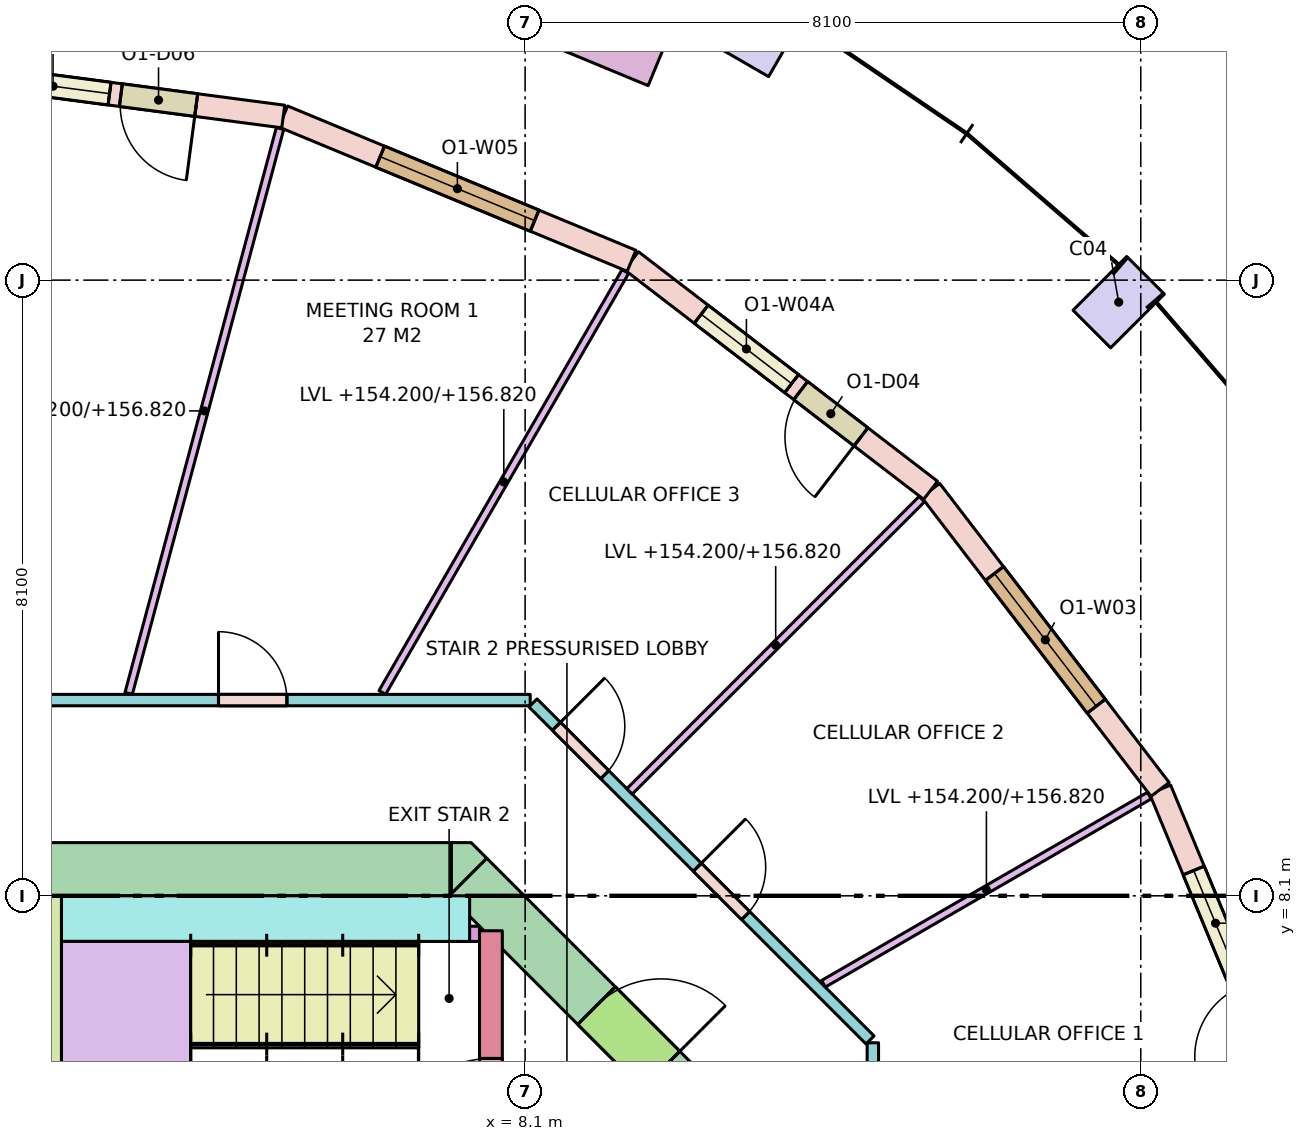
"""IFC4 building model, lengths in metres.
Left out: names, types, materials, properties, quantities, classifications, styles, units other than length and angle.
Written with IfcOpenShell. Run it as: python <this file> out.ifc"""

import sys

from ifc_helpers import new_model, si_unit, direction, frame, frame_2d, origin, origin_2d, place, context, subcontext, project, spatial, polyline, rectangle, outline, extrude, element, fill, save


model = new_model("IFC4")
c1 = context("Model", 3, precision=1e-05, world=origin(), true_north=direction((0.0, 1.0)))
c2 = subcontext(c1, "Body", "Model", "MODEL_VIEW")
j1 = project(units=[si_unit("LENGTHUNIT", "METRE"), si_unit("PLANEANGLEUNIT", "RADIAN")], contexts=[c1])
p1 = place(None, origin())
s1 = spatial("IfcSite", under=j1, at=p1, CompositionType="ELEMENT")
p2 = place(p1, origin())
s2 = spatial("IfcBuilding", under=s1, at=p2, CompositionType="ELEMENT")
p3 = place(p2, frame((0.0, 0.0, 154.2)))
s3 = spatial("IfcBuildingStorey", under=s2, at=p3, CompositionType="ELEMENT", Elevation=154.2)
for number, where, z_axis, x_axis in (
    (1, (15.91, 15.91, 0.0), (0.0, 0.0, 1.0), (-0.707, 0.707, 0.0)),
    (2, (11.25, 19.486, 0.0), (0.0, 0.0, 1.0), (-0.866, 0.5, 0.0)),
):
    element("IfcColumn", number, at=place(p3, frame(where, z_axis=z_axis, x_axis=x_axis)), inside=s3, PredefinedType="COLUMN", context=c2, shape_type="SweptSolid", body=[
        extrude(rectangle(XDim=0.7, YDim=1.0, at=origin_2d()), origin(), (0.0, 0.0, 1.0), 3.7),
    ])
p4 = place(p3, frame((-7.13, 8.45, -0.28), z_axis=(0.0, 0.0, 1.0), x_axis=(1.0, 0.0, 0.0)))
e3 = element("IfcWall", 3, at=p4, inside=s3, PredefinedType="SHEAR", context=c2, shape_type="SweptSolid", body=[
    extrude(rectangle(XDim=14.26, YDim=0.7, at=frame_2d((7.13, 0.0))), origin(), (0.0, 0.0, 1.0), 3.7),
])
p5 = place(p4, frame((5.48, 0.0, 0.28)))
e4 = element("IfcOpeningElement", 4, at=p5, cuts=e3, PredefinedType="OPENING", context=c2, shape_type="SweptSolid", body=[
    extrude(rectangle(XDim=0.7, YDim=2.1, at=frame_2d((0.35, 1.05))), frame((0.0, 0.36, 0.0), z_axis=(0.0, -1.0, 0.0), x_axis=(1.0, 0.0, 0.0)), (0.0, 0.0, 1.0), 0.72),
])
p6 = place(p4, frame((7.155, 0.0, 0.28)))
e5 = element("IfcOpeningElement", 5, at=p6, cuts=e3, PredefinedType="OPENING", context=c2, shape_type="SweptSolid", body=[
    extrude(rectangle(XDim=0.9, YDim=2.1, at=frame_2d((0.45, 1.05))), frame((0.0, 0.36, 0.0), z_axis=(0.0, -1.0, 0.0), x_axis=(1.0, 0.0, 0.0)), (0.0, 0.0, 1.0), 0.72),
])
p7 = place(p3, frame((7.347, 8.347, -0.28), z_axis=(0.0, 0.0, 1.0), x_axis=(0.707106781187, -0.707106781187, 0.0)))
e6 = element("IfcWall", 6, at=p7, inside=s3, PredefinedType="SHEAR", context=c2, shape_type="SweptSolid", body=[
    extrude(rectangle(XDim=4.243, YDim=0.7, at=frame_2d((2.121, 0.0))), origin(), (0.0, 0.0, 1.0), 3.7),
])
p8 = place(p7, frame((2.393, 0.0, 0.28)))
e7 = element("IfcOpeningElement", 7, at=p8, cuts=e6, PredefinedType="OPENING", context=c2, shape_type="SweptSolid", body=[
    extrude(rectangle(XDim=1.2, YDim=2.1, at=frame_2d((0.6, 1.05))), frame((0.0, 0.36, 0.0), z_axis=(0.0, -1.0, 0.0), x_axis=(1.0, 0.0, 0.0)), (0.0, 0.0, 1.0), 0.72),
])
p9 = place(p3, frame((0.0, 0.0, -0.28)))
e8 = element("IfcWall", 8, at=p9, inside=s3, PredefinedType="SHEAR", context=c2, shape_type="SweptSolid", body=[
    extrude(outline(polyline([(7.39, 8.8), (7.595, 8.595), (7.595, 8.595), (7.595, 8.595), (7.13, 8.13), (7.13, 8.8), (7.13, 8.8), (7.39, 8.8)])), origin(), (0.0, 0.0, 1.0), 3.7),
])
p10 = place(p3, frame((1.85, 1.5, 0.0), z_axis=(0.0, 0.0, 1.0), x_axis=(0.0, 1.0, 0.0)))
e9 = element("IfcWall", 9, at=p10, inside=s3, PredefinedType="SHEAR", context=c2, shape_type="SweptSolid", body=[
    extrude(rectangle(XDim=6.6, YDim=0.3, at=frame_2d((3.3, 0.0))), origin(), (0.0, 0.0, 1.0), 3.42),
])
p11 = place(p3, frame((7.65, 4.5, 0.0), z_axis=(0.0, 0.0, 1.0), x_axis=(0.0, 1.0, 0.0)))
e10 = element("IfcWall", 10, at=p11, inside=s3, PredefinedType="SHEAR", context=c2, shape_type="SweptSolid", body=[
    extrude(rectangle(XDim=3.14, YDim=0.3, at=frame_2d((1.57, 0.0))), origin(), (0.0, 0.0, 1.0), 3.42),
])
p12 = place(p11, frame((0.14, 0.0, 0.0)))
e11 = element("IfcOpeningElement", 11, at=p12, cuts=e10, PredefinedType="OPENING", context=c2, shape_type="SweptSolid", body=[
    extrude(rectangle(XDim=1.32, YDim=2.1, at=frame_2d((0.66, 1.05))), frame((0.0, 0.16, 0.0), z_axis=(0.0, -1.0, 0.0), x_axis=(1.0, 0.0, 0.0)), (0.0, 0.0, 1.0), 0.32),
])
p13 = place(p3, frame((2.0, 7.8, 0.0), z_axis=(0.0, 0.0, 1.0), x_axis=(1.0, 0.0, 0.0)))
e12 = element("IfcWall", 12, at=p13, inside=s3, PredefinedType="SHEAR", context=c2, shape_type="SweptSolid", body=[
    extrude(rectangle(XDim=5.37, YDim=0.6, at=frame_2d((2.685, 0.0))), origin(), (0.0, 0.0, 1.0), 3.42),
])
p14 = place(p3, frame((6.9, 7.6, 0.0), z_axis=(0.0, 0.0, 1.0), x_axis=(1.0, 0.0, 0.0)))
e13 = element("IfcWall", 13, at=p14, inside=s3, PredefinedType="SHEAR", context=c2, shape_type="SweptSolid", body=[
    extrude(rectangle(XDim=0.6, YDim=0.2, at=frame_2d((0.3, 0.0))), origin(), (0.0, 0.0, 1.0), 3.42),
])
p15 = place(p3, frame((18.353, 4.917, 0.0), z_axis=(0.0, 0.0, 1.0), x_axis=(-0.382650301762, 0.923893254961, 0.0)))
e14 = element("IfcWall", 14, at=p15, inside=s3, PredefinedType="STANDARD", context=c2, shape_type="SweptSolid", body=[
    extrude(rectangle(XDim=4.96, YDim=0.3, at=frame_2d((2.48, 0.0))), origin(), (0.0, 0.0, 1.0), 3.42),
])
p16 = place(p15, frame((1.155, 0.0, 0.0)))
e15 = element("IfcOpeningElement", 15, at=p16, cuts=e14, PredefinedType="OPENING", context=c2, shape_type="SweptSolid", body=[
    extrude(rectangle(XDim=1.0, YDim=2.4, at=frame_2d((0.5, 1.2))), frame((0.0, 0.16, 0.0), z_axis=(0.0, -1.0, 0.0), x_axis=(1.0, 0.0, 0.0)), (0.0, 0.0, 1.0), 0.32),
])
p17 = place(p15, frame((2.305, 0.0, 0.8)))
e16 = element("IfcOpeningElement", 16, at=p17, cuts=e14, PredefinedType="OPENING", context=c2, shape_type="SweptSolid", body=[
    extrude(rectangle(XDim=1.5, YDim=2.4, at=frame_2d((0.75, 1.2))), frame((0.0, 0.16, 0.0), z_axis=(0.0, -1.0, 0.0), x_axis=(1.0, 0.0, 0.0)), (0.0, 0.0, 1.0), 0.32),
])
p18 = place(p3, frame((16.455, 9.5, 0.0), z_axis=(0.0, 0.0, 1.0), x_axis=(-0.608768356425, 0.793348024649, 0.0)))
e17 = element("IfcWall", 17, at=p18, inside=s3, PredefinedType="STANDARD", context=c2, shape_type="SweptSolid", body=[
    extrude(rectangle(XDim=4.96, YDim=0.3, at=frame_2d((2.48, 0.0))), origin(), (0.0, 0.0, 1.0), 3.42),
])
p19 = place(p18, frame((1.38, 0.0, 0.8)))
e18 = element("IfcOpeningElement", 18, at=p19, cuts=e17, PredefinedType="OPENING", context=c2, shape_type="SweptSolid", body=[
    extrude(rectangle(XDim=2.2, YDim=2.4, at=frame_2d((1.1, 1.2))), frame((0.0, 0.16, 0.0), z_axis=(0.0, -1.0, 0.0), x_axis=(1.0, 0.0, 0.0)), (0.0, 0.0, 1.0), 0.32),
])
p20 = place(p3, frame((13.435, 13.435, 0.0), z_axis=(0.0, 0.0, 1.0), x_axis=(-0.793348024649, 0.608768356425, 0.0)))
e19 = element("IfcWall", 19, at=p20, inside=s3, PredefinedType="STANDARD", context=c2, shape_type="SweptSolid", body=[
    extrude(rectangle(XDim=4.96, YDim=0.3, at=frame_2d((2.48, 0.0))), origin(), (0.0, 0.0, 1.0), 3.42),
])
p21 = place(p20, frame((1.155, 0.0, 0.0)))
e20 = element("IfcOpeningElement", 20, at=p21, cuts=e19, PredefinedType="OPENING", context=c2, shape_type="SweptSolid", body=[
    extrude(rectangle(XDim=1.0, YDim=2.4, at=frame_2d((0.5, 1.2))), frame((0.0, 0.16, 0.0), z_axis=(0.0, -1.0, 0.0), x_axis=(1.0, 0.0, 0.0)), (0.0, 0.0, 1.0), 0.32),
])
p22 = place(p20, frame((2.305, 0.0, 0.8)))
e21 = element("IfcOpeningElement", 21, at=p22, cuts=e19, PredefinedType="OPENING", context=c2, shape_type="SweptSolid", body=[
    extrude(rectangle(XDim=1.5, YDim=2.4, at=frame_2d((0.75, 1.2))), frame((0.0, 0.16, 0.0), z_axis=(0.0, -1.0, 0.0), x_axis=(1.0, 0.0, 0.0)), (0.0, 0.0, 1.0), 0.32),
])
p23 = place(p3, frame((9.5, 16.455, 0.0), z_axis=(0.0, 0.0, 1.0), x_axis=(-0.923893254961, 0.382650301762, 0.0)))
e22 = element("IfcWall", 22, at=p23, inside=s3, PredefinedType="STANDARD", context=c2, shape_type="SweptSolid", body=[
    extrude(rectangle(XDim=4.96, YDim=0.3, at=frame_2d((2.48, 0.0))), origin(), (0.0, 0.0, 1.0), 3.42),
])
p24 = place(p23, frame((1.38, 0.0, 0.8)))
e23 = element("IfcOpeningElement", 23, at=p24, cuts=e22, PredefinedType="OPENING", context=c2, shape_type="SweptSolid", body=[
    extrude(rectangle(XDim=2.2, YDim=2.4, at=frame_2d((1.1, 1.2))), frame((0.0, 0.16, 0.0), z_axis=(0.0, -1.0, 0.0), x_axis=(1.0, 0.0, 0.0)), (0.0, 0.0, 1.0), 0.32),
])
p25 = place(p3, frame((4.917, 18.353, 0.0), z_axis=(0.0, 0.0, 1.0), x_axis=(-0.991443234469, 0.130538549191, 0.0)))
e24 = element("IfcWall", 24, at=p25, inside=s3, PredefinedType="STANDARD", context=c2, shape_type="SweptSolid", body=[
    extrude(rectangle(XDim=4.96, YDim=0.3, at=frame_2d((2.48, 0.0))), origin(), (0.0, 0.0, 1.0), 3.42),
])
p26 = place(p25, frame((1.155, 0.0, 0.0)))
e25 = element("IfcOpeningElement", 25, at=p26, cuts=e24, PredefinedType="OPENING", context=c2, shape_type="SweptSolid", body=[
    extrude(rectangle(XDim=1.0, YDim=2.4, at=frame_2d((0.5, 1.2))), frame((0.0, 0.16, 0.0), z_axis=(0.0, -1.0, 0.0), x_axis=(1.0, 0.0, 0.0)), (0.0, 0.0, 1.0), 0.32),
])
p27 = place(p25, frame((2.305, 0.0, 0.8)))
e26 = element("IfcOpeningElement", 26, at=p27, cuts=e24, PredefinedType="OPENING", context=c2, shape_type="SweptSolid", body=[
    extrude(rectangle(XDim=1.5, YDim=2.4, at=frame_2d((0.75, 1.2))), frame((0.0, 0.16, 0.0), z_axis=(0.0, -1.0, 0.0), x_axis=(1.0, 0.0, 0.0)), (0.0, 0.0, 1.0), 0.32),
])
p28 = place(p3, frame((9.814, 18.99, 0.0), z_axis=(0.0, 0.0, 1.0), x_axis=(-0.923875488976, 0.382693194178, 0.0)))
e27 = element("IfcWall", 27, at=p28, inside=s3, PredefinedType="PARAPET", context=c2, shape_type="SweptSolid", body=[
    extrude(rectangle(XDim=3.6, YDim=0.5, at=frame_2d((1.8, 0.0))), origin(), (0.0, 0.0, 1.0), 0.9),
])
p29 = place(p3, frame((-8.167, 10.675, 0.0), z_axis=(0.0, 0.0, 1.0), x_axis=(1.0, 0.0, 0.0)))
e28 = element("IfcWall", 28, at=p29, inside=s3, PredefinedType="PARTITIONING", context=c2, shape_type="SweptSolid", body=[
    extrude(rectangle(XDim=16.333, YDim=0.15, at=frame_2d((8.167, 0.0))), origin(), (0.0, 0.0, 1.0), 2.62),
])
p30 = place(p29, frame((12.232, 0.0, 0.0)))
e29 = element("IfcOpeningElement", 29, at=p30, cuts=e28, PredefinedType="OPENING", context=c2, shape_type="SweptSolid", body=[
    extrude(rectangle(XDim=0.9, YDim=2.1, at=frame_2d((0.45, 1.05))), frame((0.0, 0.085, 0.0), z_axis=(0.0, -1.0, 0.0), x_axis=(1.0, 0.0, 0.0)), (0.0, 0.0, 1.0), 0.17),
])
p31 = place(p29, frame((4.639, 0.0, 0.0)))
e30 = element("IfcOpeningElement", 30, at=p31, cuts=e28, PredefinedType="OPENING", context=c2, shape_type="SweptSolid", body=[
    extrude(rectangle(XDim=1.8, YDim=2.1, at=frame_2d((0.9, 1.05))), frame((0.0, 0.085, 0.0), z_axis=(0.0, -1.0, 0.0), x_axis=(1.0, 0.0, 0.0)), (0.0, 0.0, 1.0), 0.17),
])
p32 = place(p3, frame((8.204, 10.638, 0.0), z_axis=(0.0, 0.0, 1.0), x_axis=(0.707106781187, -0.707106781187, 0.0)))
e31 = element("IfcWall", 31, at=p32, inside=s3, PredefinedType="PARTITIONING", context=c2, shape_type="SweptSolid", body=[
    extrude(rectangle(XDim=6.271, YDim=0.15, at=frame_2d((3.135, 0.0))), origin(), (0.0, 0.0, 1.0), 2.62),
])
p33 = place(p32, frame((3.057, 0.0, 0.0)))
e32 = element("IfcOpeningElement", 32, at=p33, cuts=e31, PredefinedType="OPENING", context=c2, shape_type="SweptSolid", body=[
    extrude(rectangle(XDim=0.9, YDim=2.1, at=frame_2d((0.45, 1.05))), frame((0.0, 0.085, 0.0), z_axis=(0.0, -1.0, 0.0), x_axis=(1.0, 0.0, 0.0)), (0.0, 0.0, 1.0), 0.17),
])
p34 = place(p32, frame((0.436, 0.0, 0.0)))
e33 = element("IfcOpeningElement", 33, at=p34, cuts=e31, PredefinedType="OPENING", context=c2, shape_type="SweptSolid", body=[
    extrude(rectangle(XDim=0.9, YDim=2.1, at=frame_2d((0.45, 1.05))), frame((0.0, 0.085, 0.0), z_axis=(0.0, -1.0, 0.0), x_axis=(1.0, 0.0, 0.0)), (0.0, 0.0, 1.0), 0.17),
])
p35 = place(p3, frame((12.675, 6.167, 0.0), z_axis=(0.0, 0.0, 1.0), x_axis=(0.0, -1.0, 0.0)))
e34 = element("IfcWall", 34, at=p35, inside=s3, PredefinedType="PARTITIONING", context=c2, shape_type="SweptSolid", body=[
    extrude(rectangle(XDim=12.333, YDim=0.15, at=frame_2d((6.167, 0.0))), origin(), (0.0, 0.0, 1.0), 2.62),
])
p36 = place(p35, frame((3.568, 0.0, 0.0)))
e35 = element("IfcOpeningElement", 35, at=p36, cuts=e34, PredefinedType="OPENING", context=c2, shape_type="SweptSolid", body=[
    extrude(rectangle(XDim=1.8, YDim=2.1, at=frame_2d((0.9, 1.05))), frame((0.0, 0.085, 0.0), z_axis=(0.0, -1.0, 0.0), x_axis=(1.0, 0.0, 0.0)), (0.0, 0.0, 1.0), 0.17),
])
p37 = place(p35, frame((0.96, 0.0, 0.0)))
e36 = element("IfcOpeningElement", 36, at=p37, cuts=e34, PredefinedType="OPENING", context=c2, shape_type="SweptSolid", body=[
    extrude(rectangle(XDim=0.9, YDim=2.1, at=frame_2d((0.45, 1.05))), frame((0.0, 0.085, 0.0), z_axis=(0.0, -1.0, 0.0), x_axis=(1.0, 0.0, 0.0)), (0.0, 0.0, 1.0), 0.17),
])
p38 = place(p35, frame((10.473, 0.0, 0.0)))
e37 = element("IfcOpeningElement", 37, at=p38, cuts=e34, PredefinedType="OPENING", context=c2, shape_type="SweptSolid", body=[
    extrude(rectangle(XDim=0.9, YDim=2.1, at=frame_2d((0.45, 1.05))), frame((0.0, 0.085, 0.0), z_axis=(0.0, -1.0, 0.0), x_axis=(1.0, 0.0, 0.0)), (0.0, 0.0, 1.0), 0.17),
])
p39 = place(p35, frame((7.416, 0.0, 0.0)))
e38 = element("IfcOpeningElement", 38, at=p39, cuts=e34, PredefinedType="OPENING", context=c2, shape_type="SweptSolid", body=[
    extrude(rectangle(XDim=0.9, YDim=2.1, at=frame_2d((0.45, 1.05))), frame((0.0, 0.085, 0.0), z_axis=(0.0, -1.0, 0.0), x_axis=(1.0, 0.0, 0.0)), (0.0, 0.0, 1.0), 0.17),
])
p40 = place(p3, frame((12.025, 6.943, 0.0), z_axis=(0.0, 0.0, 1.0), x_axis=(0.866025463095, 0.499999897272, 0.0)))
e39 = element("IfcWall", 39, at=p40, inside=s3, PredefinedType="PARTITIONING", context=c2, shape_type="SweptSolid", body=[
    extrude(rectangle(XDim=4.951, YDim=0.1, at=frame_2d((2.476, 0.0))), origin(), (0.0, 0.0, 1.0), 2.62),
])
p41 = place(p3, frame((9.474, 9.474, 0.0), z_axis=(0.0, 0.0, 1.0), x_axis=(0.707106781187, 0.707106781187, 0.0)))
e40 = element("IfcWall", 40, at=p41, inside=s3, PredefinedType="PARTITIONING", context=c2, shape_type="SweptSolid", body=[
    extrude(rectangle(XDim=5.439, YDim=0.1, at=frame_2d((2.719, 0.0))), origin(), (0.0, 0.0, 1.0), 2.62),
])
p42 = place(p3, frame((6.221, 10.775, 0.0), z_axis=(0.0, 0.0, 1.0), x_axis=(0.500023166934, 0.866012027936, 0.0)))
e41 = element("IfcWall", 41, at=p42, inside=s3, PredefinedType="PARTITIONING", context=c2, shape_type="SweptSolid", body=[
    extrude(rectangle(XDim=6.395, YDim=0.1, at=frame_2d((3.198, 0.0))), origin(), (0.0, 0.0, 1.0), 2.62),
])
p43 = place(p3, frame((2.884, 10.764, 0.0), z_axis=(0.0, 0.0, 1.0), x_axis=(0.25881804804, 0.965926093451, 0.0)))
e42 = element("IfcWall", 42, at=p43, inside=s3, PredefinedType="PARTITIONING", context=c2, shape_type="SweptSolid", body=[
    extrude(rectangle(XDim=7.693, YDim=0.1, at=frame_2d((3.846, 0.0))), origin(), (0.0, 0.0, 1.0), 2.62),
])
p44 = place(p17, origin())
e43 = element("IfcWindow", 43, at=p44, inside=s3, PartitioningType="SINGLE_PANEL", PredefinedType="WINDOW", context=c2, shape_type="SweptSolid", body=[
    extrude(rectangle(XDim=1.5, YDim=2.4, at=frame_2d((0.75, 1.2))), frame((0.0, 0.03, 0.0), z_axis=(0.0, -1.0, 0.0), x_axis=(1.0, 0.0, 0.0)), (0.0, 0.0, 1.0), 0.06),
])
fill(e16, e43)
p45 = place(p19, origin())
e44 = element("IfcWindow", 44, at=p45, inside=s3, PartitioningType="SINGLE_PANEL", PredefinedType="WINDOW", context=c2, shape_type="SweptSolid", body=[
    extrude(rectangle(XDim=2.2, YDim=2.4, at=frame_2d((1.1, 1.2))), frame((0.0, 0.03, 0.0), z_axis=(0.0, -1.0, 0.0), x_axis=(1.0, 0.0, 0.0)), (0.0, 0.0, 1.0), 0.06),
])
fill(e18, e44)
p46 = place(p21, origin())
e45 = element("IfcDoor", 45, at=p46, inside=s3, OperationType="SINGLE_SWING_LEFT", PredefinedType="DOOR", context=c2, shape_type="SweptSolid", body=[
    extrude(rectangle(XDim=1.0, YDim=2.4, at=frame_2d((0.5, 1.2))), frame((0.0, 0.025, 0.0), z_axis=(0.0, -1.0, 0.0), x_axis=(1.0, 0.0, 0.0)), (0.0, 0.0, 1.0), 0.05),
])
fill(e20, e45)
p47 = place(p22, origin())
e46 = element("IfcWindow", 46, at=p47, inside=s3, PartitioningType="SINGLE_PANEL", PredefinedType="WINDOW", context=c2, shape_type="SweptSolid", body=[
    extrude(rectangle(XDim=1.5, YDim=2.4, at=frame_2d((0.75, 1.2))), frame((0.0, 0.03, 0.0), z_axis=(0.0, -1.0, 0.0), x_axis=(1.0, 0.0, 0.0)), (0.0, 0.0, 1.0), 0.06),
])
fill(e21, e46)
p48 = place(p24, origin())
e47 = element("IfcWindow", 47, at=p48, inside=s3, PartitioningType="SINGLE_PANEL", PredefinedType="WINDOW", context=c2, shape_type="SweptSolid", body=[
    extrude(rectangle(XDim=2.2, YDim=2.4, at=frame_2d((1.1, 1.2))), frame((0.0, 0.03, 0.0), z_axis=(0.0, -1.0, 0.0), x_axis=(1.0, 0.0, 0.0)), (0.0, 0.0, 1.0), 0.06),
])
fill(e23, e47)
p49 = place(p26, origin())
e48 = element("IfcDoor", 48, at=p49, inside=s3, OperationType="SINGLE_SWING_LEFT", PredefinedType="DOOR", context=c2, shape_type="SweptSolid", body=[
    extrude(rectangle(XDim=1.0, YDim=2.4, at=frame_2d((0.5, 1.2))), frame((0.0, 0.025, 0.0), z_axis=(0.0, -1.0, 0.0), x_axis=(1.0, 0.0, 0.0)), (0.0, 0.0, 1.0), 0.05),
])
fill(e25, e48)
p50 = place(p27, origin())
e49 = element("IfcWindow", 49, at=p50, inside=s3, PartitioningType="SINGLE_PANEL", PredefinedType="WINDOW", context=c2, shape_type="SweptSolid", body=[
    extrude(rectangle(XDim=1.5, YDim=2.4, at=frame_2d((0.75, 1.2))), frame((0.0, 0.03, 0.0), z_axis=(0.0, -1.0, 0.0), x_axis=(1.0, 0.0, 0.0)), (0.0, 0.0, 1.0), 0.06),
])
fill(e26, e49)
p51 = place(p12, origin())
e50 = element("IfcDoor", 50, at=p51, inside=s3, OperationType="DOUBLE_DOOR_SINGLE_SWING", PredefinedType="DOOR", context=c2, shape_type="SweptSolid", body=[
    extrude(rectangle(XDim=1.32, YDim=2.1, at=frame_2d((0.66, 1.05))), frame((0.0, 0.025, 0.0), z_axis=(0.0, -1.0, 0.0), x_axis=(1.0, 0.0, 0.0)), (0.0, 0.0, 1.0), 0.05),
])
fill(e11, e50)
p52 = place(p8, origin())
e51 = element("IfcDoor", 51, at=p52, inside=s3, OperationType="SINGLE_SWING_RIGHT", PredefinedType="DOOR", context=c2, shape_type="SweptSolid", body=[
    extrude(rectangle(XDim=1.2, YDim=2.1, at=frame_2d((0.6, 1.05))), frame((0.0, 0.025, 0.0), z_axis=(0.0, -1.0, 0.0), x_axis=(1.0, 0.0, 0.0)), (0.0, 0.0, 1.0), 0.05),
])
fill(e7, e51)
p53 = place(p33, origin())
e52 = element("IfcDoor", 52, at=p53, inside=s3, OperationType="SINGLE_SWING_LEFT", PredefinedType="DOOR", context=c2, shape_type="SweptSolid", body=[
    extrude(rectangle(XDim=0.9, YDim=2.1, at=frame_2d((0.45, 1.05))), frame((0.0, 0.025, 0.0), z_axis=(0.0, -1.0, 0.0), x_axis=(1.0, 0.0, 0.0)), (0.0, 0.0, 1.0), 0.05),
])
fill(e32, e52)
p54 = place(p34, origin())
e53 = element("IfcDoor", 53, at=p54, inside=s3, OperationType="SINGLE_SWING_LEFT", PredefinedType="DOOR", context=c2, shape_type="SweptSolid", body=[
    extrude(rectangle(XDim=0.9, YDim=2.1, at=frame_2d((0.45, 1.05))), frame((0.0, 0.025, 0.0), z_axis=(0.0, -1.0, 0.0), x_axis=(1.0, 0.0, 0.0)), (0.0, 0.0, 1.0), 0.05),
])
fill(e33, e53)
p55 = place(p30, origin())
e54 = element("IfcDoor", 54, at=p55, inside=s3, OperationType="SINGLE_SWING_LEFT", PredefinedType="DOOR", context=c2, shape_type="SweptSolid", body=[
    extrude(rectangle(XDim=0.9, YDim=2.1, at=frame_2d((0.45, 1.05))), frame((0.0, 0.025, 0.0), z_axis=(0.0, -1.0, 0.0), x_axis=(1.0, 0.0, 0.0)), (0.0, 0.0, 1.0), 0.05),
])
fill(e29, e54)
save(model, sys.argv[1])
